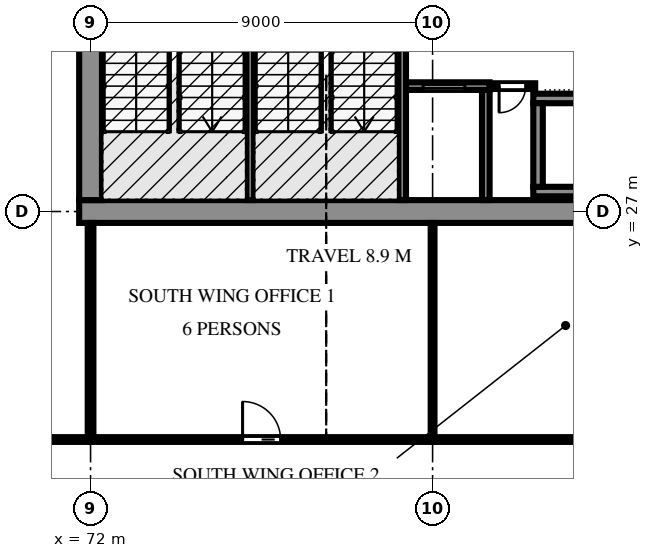
"""IFC4 building model, lengths in metres.
Left out: names, types, materials, properties, quantities, classifications, styles, units other than length and angle.
Written with IfcOpenShell. Run it as: python <this file> out.ifc"""

import sys

from ifc_helpers import new_model, si_unit, direction, frame, frame_2d, origin, place, context, subcontext, project, spatial, polyline, rectangle, outline, extrude, element, fill, save


model = new_model("IFC4")
c1 = context("Model", 3, precision=1e-05, world=origin(), true_north=direction((0.0, 1.0)))
c2 = subcontext(c1, "Body", "Model", "MODEL_VIEW")
j1 = project(units=[si_unit("LENGTHUNIT", "METRE"), si_unit("PLANEANGLEUNIT", "RADIAN")], contexts=[c1])
p1 = place(None, origin())
s1 = spatial("IfcSite", under=j1, at=p1, CompositionType="ELEMENT")
p2 = place(p1, origin())
s2 = spatial("IfcBuilding", under=s1, at=p2, CompositionType="ELEMENT")
p3 = place(p2, frame((0.0, 0.0, 7.5)))
s3 = spatial("IfcBuildingStorey", under=s2, at=p3, CompositionType="ELEMENT", Elevation=7.5)
p4 = place(p3, frame((71.7, 27.0, 0.0), z_axis=(0.0, 0.0, 1.0), x_axis=(1.0, 0.0, 0.0)))
e1 = element("IfcWall", 1, at=p4, inside=s3, PredefinedType="SOLIDWALL", context=c2, shape_type="SweptSolid", body=[
    extrude(rectangle(XDim=18.6, YDim=0.6, at=frame_2d((9.3, 0.0))), origin(), (0.0, 0.0, 1.0), 4.2),
])
p5 = place(p3, frame((72.0, 27.3, 0.0), z_axis=(0.0, 0.0, 1.0), x_axis=(0.0, 1.0, 0.0)))
e2 = element("IfcWall", 2, at=p5, inside=s3, PredefinedType="SOLIDWALL", context=c2, shape_type="SweptSolid", body=[
    extrude(rectangle(XDim=8.4, YDim=0.6, at=frame_2d((4.2, 0.0))), origin(), (0.0, 0.0, 1.0), 4.2),
])
for number, where, z_axis, x_axis in (
    (3, (76.2, 27.302, -0.13), (0.0, 0.0, 1.0), (0.0, 1.0, 0.0)),
    (4, (80.2, 27.302, -0.13), (0.0, 0.0, 1.0), (0.0, 1.0, 0.0)),
):
    element("IfcWall", number, at=place(p3, frame(where, z_axis=z_axis, x_axis=x_axis)), inside=s3, PredefinedType="SOLIDWALL", context=c2, shape_type="SweptSolid", body=[
        extrude(rectangle(XDim=8.396, YDim=0.2, at=frame_2d((4.198, 0.0))), origin(), (0.0, 0.0, 1.0), 3.646),
    ])
p6 = place(p3, frame((80.302, 30.3, 0.0), z_axis=(0.0, 0.0, 1.0), x_axis=(1.0, 0.0, 0.0)))
e5 = element("IfcWall", 5, at=p6, inside=s3, PredefinedType="SOLIDWALL", context=c2, shape_type="SweptSolid", body=[
    extrude(rectangle(XDim=2.198, YDim=0.2, at=frame_2d((1.099, 0.0))), origin(), (0.0, 0.0, 1.0), 3.516),
])
p7 = place(p6, frame((0.448, 0.0, 0.0)))
e6 = element("IfcOpeningElement", 6, at=p7, cuts=e5, PredefinedType="OPENING", context=c2, shape_type="SweptSolid", body=[
    extrude(rectangle(XDim=1.1, YDim=2.1, at=frame_2d((0.55, 1.05))), frame((0.0, 0.11, 0.0), z_axis=(0.0, -1.0, 0.0), x_axis=(1.0, 0.0, 0.0)), (0.0, 0.0, 1.0), 0.22),
])
p8 = place(p3, frame((82.4, 27.302, 0.0), z_axis=(0.0, 0.0, 1.0), x_axis=(0.0, 1.0, 0.0)))
e7 = element("IfcWall", 7, at=p8, inside=s3, PredefinedType="SOLIDWALL", context=c2, shape_type="SweptSolid", body=[
    extrude(rectangle(XDim=2.898, YDim=0.2, at=frame_2d((1.449, 0.0))), origin(), (0.0, 0.0, 1.0), 3.516),
])
for number, where, z_axis, x_axis in (
    (8, (83.65, 27.525, 0.0), (0.0, 0.0, 1.0), (1.0, 0.0, 0.0)),
    (9, (83.65, 29.975, 0.0), (0.0, 0.0, 1.0), (1.0, 0.0, 0.0)),
):
    element("IfcWall", number, at=place(p3, frame(where, z_axis=z_axis, x_axis=x_axis)), inside=s3, PredefinedType="SOLIDWALL", context=c2, shape_type="SweptSolid", body=[
        extrude(rectangle(XDim=3.4, YDim=0.25, at=frame_2d((1.7, 0.0))), origin(), (0.0, 0.0, 1.0), 3.516),
    ])
p9 = place(p3, frame((83.775, 27.65, 0.0), z_axis=(0.0, 0.0, 1.0), x_axis=(0.0, 1.0, 0.0)))
e10 = element("IfcWall", 10, at=p9, inside=s3, PredefinedType="SOLIDWALL", context=c2, shape_type="SweptSolid", body=[
    extrude(rectangle(XDim=2.2, YDim=0.25, at=frame_2d((1.1, 0.0))), origin(), (0.0, 0.0, 1.0), 3.516),
])
p10 = place(p3, frame((81.0, 21.0, 0.0), z_axis=(0.0, 0.0, 1.0), x_axis=(1.0, 0.0, 0.0)))
e11 = element("IfcWall", 11, at=p10, inside=s3, PredefinedType="PARTITIONING", context=c2, shape_type="SweptSolid", body=[
    extrude(rectangle(XDim=9.0, YDim=0.125, at=frame_2d((4.5, 0.0))), origin(), (0.0, 0.0, 1.0), 3.307),
])
p11 = place(p10, frame((4.0, 0.0, 0.0)))
e12 = element("IfcOpeningElement", 12, at=p11, cuts=e11, PredefinedType="OPENING", context=c2, shape_type="SweptSolid", body=[
    extrude(rectangle(XDim=1.0, YDim=2.1, at=frame_2d((0.5, 1.05))), frame((0.0, 0.073, 0.0), z_axis=(0.0, -1.0, 0.0), x_axis=(1.0, 0.0, 0.0)), (0.0, 0.0, 1.0), 0.145),
])
p12 = place(p3, frame((72.0, 21.0, 0.0), z_axis=(0.0, 0.0, 1.0), x_axis=(1.0, 0.0, 0.0)))
e13 = element("IfcWall", 13, at=p12, inside=s3, PredefinedType="PARTITIONING", context=c2, shape_type="SweptSolid", body=[
    extrude(rectangle(XDim=9.0, YDim=0.125, at=frame_2d((4.5, 0.0))), origin(), (0.0, 0.0, 1.0), 3.307),
])
p13 = place(p12, frame((4.0, 0.0, 0.0)))
e14 = element("IfcOpeningElement", 14, at=p13, cuts=e13, PredefinedType="OPENING", context=c2, shape_type="SweptSolid", body=[
    extrude(rectangle(XDim=1.0, YDim=2.1, at=frame_2d((0.5, 1.05))), frame((0.0, 0.073, 0.0), z_axis=(0.0, -1.0, 0.0), x_axis=(1.0, 0.0, 0.0)), (0.0, 0.0, 1.0), 0.145),
])
p14 = place(p3, frame((63.112, 21.0, 0.0), z_axis=(0.0, 0.0, 1.0), x_axis=(1.0, 0.0, 0.0)))
e15 = element("IfcWall", 15, at=p14, inside=s3, PredefinedType="PARTITIONING", context=c2, shape_type="SweptSolid", body=[
    extrude(rectangle(XDim=8.888, YDim=0.125, at=frame_2d((4.444, 0.0))), origin(), (0.0, 0.0, 1.0), 3.307),
])
p15 = place(p14, frame((3.888, 0.0, 0.0)))
e16 = element("IfcOpeningElement", 16, at=p15, cuts=e15, PredefinedType="OPENING", context=c2, shape_type="SweptSolid", body=[
    extrude(rectangle(XDim=1.0, YDim=2.1, at=frame_2d((0.5, 1.05))), frame((0.0, 0.073, 0.0), z_axis=(0.0, -1.0, 0.0), x_axis=(1.0, 0.0, 0.0)), (0.0, 0.0, 1.0), 0.145),
])
p16 = place(p3, frame((72.0, 26.698, 0.0), z_axis=(0.0, 0.0, 1.0), x_axis=(0.0, -1.0, 0.0)))
e17 = element("IfcWall", 17, at=p16, inside=s3, PredefinedType="PARTITIONING", context=c2, shape_type="SweptSolid", body=[
    extrude(rectangle(XDim=5.635, YDim=0.15, at=frame_2d((2.818, 0.0))), origin(), (0.0, 0.0, 1.0), 3.307),
])
p17 = place(p3, frame((81.0, 26.698, 0.0), z_axis=(0.0, 0.0, 1.0), x_axis=(0.0, -1.0, 0.0)))
e18 = element("IfcWall", 18, at=p17, inside=s3, PredefinedType="PARTITIONING", context=c2, shape_type="SweptSolid", body=[
    extrude(rectangle(XDim=5.635, YDim=0.1, at=frame_2d((2.818, 0.0))), origin(), (0.0, 0.0, 1.0), 3.643),
])
p18 = place(p3, frame((83.7, 30.3, 0.0), z_axis=(0.0, 0.0, 1.0), x_axis=(-1.0, 0.0, 0.0)))
e19 = element("IfcWall", 19, at=p18, inside=s3, PredefinedType="SOLIDWALL", context=c2, shape_type="SweptSolid", body=[
    extrude(rectangle(XDim=1.198, YDim=0.15, at=frame_2d((0.599, 0.0))), origin(), (0.0, 0.0, 1.0), 3.516),
])
p19 = place(p18, frame((0.25, 0.0, 0.0)))
e20 = element("IfcOpeningElement", 20, at=p19, cuts=e19, PredefinedType="OPENING", context=c2, shape_type="SweptSolid", body=[
    extrude(rectangle(XDim=0.7, YDim=2.0, at=frame_2d((0.35, 1.0))), frame((0.0, 0.085, 0.0), z_axis=(0.0, -1.0, 0.0), x_axis=(1.0, 0.0, 0.0)), (0.0, 0.0, 1.0), 0.17),
])
p20 = place(p7, origin())
e21 = element("IfcDoor", 21, at=p20, inside=s3, OperationType="SLIDING_TO_LEFT", PredefinedType="DOOR", context=c2, shape_type="SweptSolid", body=[
    extrude(outline(polyline([(0.0, 0.0), (0.07, 0.0), (0.07, 2.03), (1.03, 2.03), (1.03, 0.0), (1.1, 0.0), (1.1, 2.1), (0.0, 2.1), (0.0, 0.0)])), frame((0.0, 0.025, 0.0), z_axis=(0.0, -1.0, 0.0), x_axis=(1.0, 0.0, 0.0)), (0.0, 0.0, 1.0), 0.05),
    extrude(rectangle(XDim=0.524, YDim=2.016, at=frame_2d((0.336, 1.018))), frame((0.0, 0.018, 0.0), z_axis=(0.0, -1.0, 0.0), x_axis=(1.0, 0.0, 0.0)), (0.0, 0.0, 1.0), 0.016),
    extrude(rectangle(XDim=0.52, YDim=2.016, at=frame_2d((0.766, 1.018))), frame((0.0, -0.002, 0.0), z_axis=(0.0, -1.0, 0.0), x_axis=(1.0, 0.0, 0.0)), (0.0, 0.0, 1.0), 0.016),
])
fill(e6, e21)
p21 = place(p13, origin())
e22 = element("IfcDoor", 22, at=p21, inside=s3, OperationType="SINGLE_SWING_LEFT", PredefinedType="DOOR", context=c2, shape_type="SweptSolid", body=[
    extrude(outline(polyline([(0.0, 0.0), (0.07, 0.0), (0.07, 2.03), (0.93, 2.03), (0.93, 0.0), (1.0, 0.0), (1.0, 2.1), (0.0, 2.1), (0.0, 0.0)])), frame((0.0, 0.025, 0.0), z_axis=(0.0, -1.0, 0.0), x_axis=(1.0, 0.0, 0.0)), (0.0, 0.0, 1.0), 0.05),
    extrude(outline(polyline([(0.074, 0.01), (0.926, 0.01), (0.926, 2.026), (0.074, 2.026), (0.074, 0.01)]), holes=[polyline([(0.194, 0.16), (0.806, 0.16), (0.806, 1.01), (0.194, 1.01), (0.194, 0.16)]), polyline([(0.35, 1.16), (0.65, 1.16), (0.65, 1.76), (0.35, 1.76), (0.35, 1.16)])]), frame((0.0, 0.017, 0.0), z_axis=(0.0, -1.0, 0.0), x_axis=(1.0, 0.0, 0.0)), (0.0, 0.0, 1.0), 0.035),
    extrude(rectangle(XDim=0.612, YDim=0.85, at=frame_2d((0.5, 0.585))), frame((0.0, 0.009, 0.0), z_axis=(0.0, -1.0, 0.0), x_axis=(1.0, 0.0, 0.0)), (0.0, 0.0, 1.0), 0.017),
    extrude(rectangle(XDim=0.3, YDim=0.6, at=frame_2d((0.5, 1.46))), frame((0.0, 0.006, 0.0), z_axis=(0.0, -1.0, 0.0), x_axis=(1.0, 0.0, 0.0)), (0.0, 0.0, 1.0), 0.012),
])
fill(e14, e22)
p22 = place(p19, origin())
e23 = element("IfcDoor", 23, at=p22, inside=s3, OperationType="SINGLE_SWING_RIGHT", PredefinedType="DOOR", context=c2, shape_type="SweptSolid", body=[
    extrude(outline(polyline([(0.0, 0.0), (0.07, 0.0), (0.07, 1.93), (0.63, 1.93), (0.63, 0.0), (0.7, 0.0), (0.7, 2.0), (0.0, 2.0), (0.0, 0.0)])), frame((0.0, 0.025, 0.0), z_axis=(0.0, -1.0, 0.0), x_axis=(1.0, 0.0, 0.0)), (0.0, 0.0, 1.0), 0.05),
    extrude(outline(polyline([(0.074, 0.01), (0.626, 0.01), (0.626, 1.926), (0.074, 1.926), (0.074, 0.01)]), holes=[polyline([(0.184, 0.16), (0.516, 0.16), (0.516, 1.01), (0.184, 1.01), (0.184, 0.16)]), polyline([(0.2, 1.16), (0.5, 1.16), (0.5, 1.76), (0.2, 1.76), (0.2, 1.16)])]), frame((0.0, 0.017, 0.0), z_axis=(0.0, -1.0, 0.0), x_axis=(1.0, 0.0, 0.0)), (0.0, 0.0, 1.0), 0.035),
    extrude(rectangle(XDim=0.331, YDim=0.85, at=frame_2d((0.35, 0.585))), frame((0.0, 0.009, 0.0), z_axis=(0.0, -1.0, 0.0), x_axis=(1.0, 0.0, 0.0)), (0.0, 0.0, 1.0), 0.017),
    extrude(rectangle(XDim=0.3, YDim=0.6, at=frame_2d((0.35, 1.46))), frame((0.0, 0.006, 0.0), z_axis=(0.0, -1.0, 0.0), x_axis=(1.0, 0.0, 0.0)), (0.0, 0.0, 1.0), 0.012),
])
fill(e20, e23)
save(model, sys.argv[1])
